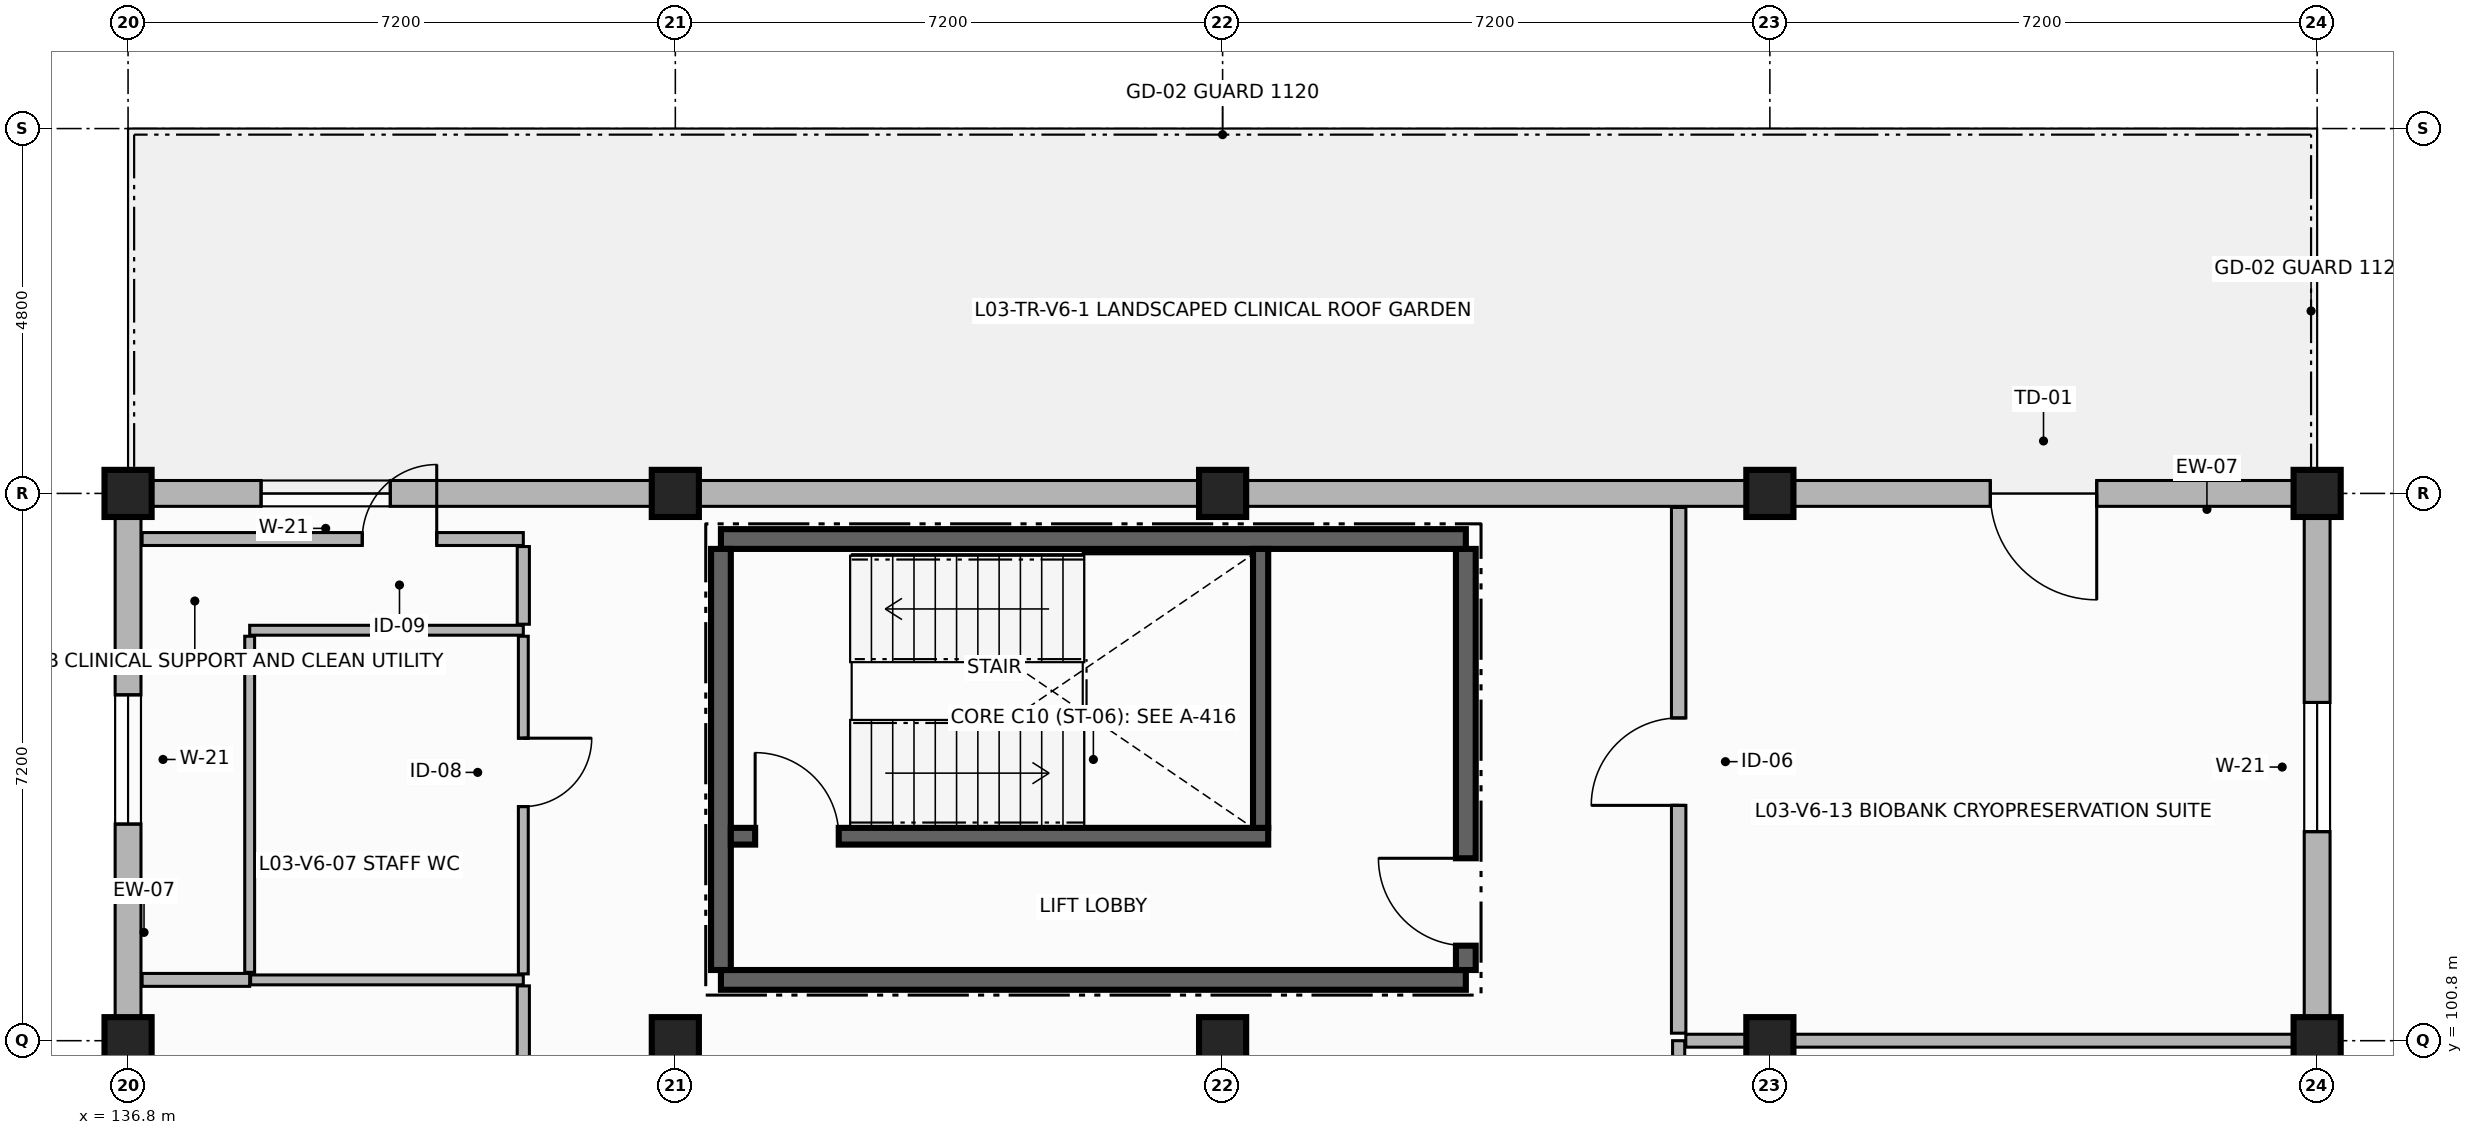
"""IFC4 building model, lengths in metres.
Left out: names, types, materials, properties, quantities, classifications, styles, units other than length and angle.
Written with IfcOpenShell. Run it as: python <this file> out.ifc"""

import sys

from ifc_helpers import new_model, si_unit, direction, frame, frame_2d, origin, origin_2d, place, context, subcontext, project, spatial, rectangle, extrude, element, fill, save


model = new_model("IFC4")
c1 = context("Model", 3, precision=1e-05, world=origin(), true_north=direction((0.0, 1.0)))
c2 = subcontext(c1, "Body", "Model", "MODEL_VIEW")
j1 = project(units=[si_unit("LENGTHUNIT", "METRE"), si_unit("PLANEANGLEUNIT", "RADIAN")], contexts=[c1])
p1 = place(None, origin())
s1 = spatial("IfcSite", under=j1, at=p1, CompositionType="ELEMENT")
p2 = place(p1, origin())
s2 = spatial("IfcBuilding", under=s1, at=p2, CompositionType="ELEMENT")
p3 = place(p2, frame((0.0, 0.0, 12.3)))
s3 = spatial("IfcBuildingStorey", under=s2, at=p3, CompositionType="ELEMENT", Elevation=12.3)
for number, where, z_axis, x_axis in (
    (1, (136.8, 100.8, 0.0), (0.0, 0.0, 1.0), (1.0, 0.0, 0.0)),
    (2, (136.8, 108.0, 0.0), (0.0, 0.0, 1.0), (1.0, 0.0, 0.0)),
    (3, (144.0, 100.8, 0.0), (0.0, 0.0, 1.0), (1.0, 0.0, 0.0)),
    (4, (144.0, 108.0, 0.0), (0.0, 0.0, 1.0), (1.0, 0.0, 0.0)),
    (5, (151.2, 100.8, 0.0), (0.0, 0.0, 1.0), (1.0, 0.0, 0.0)),
    (6, (151.2, 108.0, 0.0), (0.0, 0.0, 1.0), (1.0, 0.0, 0.0)),
    (7, (158.4, 100.8, 0.0), (0.0, 0.0, 1.0), (1.0, 0.0, 0.0)),
    (8, (158.4, 108.0, 0.0), (0.0, 0.0, 1.0), (1.0, 0.0, 0.0)),
    (9, (165.6, 100.8, 0.0), (0.0, 0.0, 1.0), (1.0, 0.0, 0.0)),
    (10, (165.6, 108.0, 0.0), (0.0, 0.0, 1.0), (1.0, 0.0, 0.0)),
):
    element("IfcColumn", number, at=place(p3, frame(where, z_axis=z_axis, x_axis=x_axis)), inside=s3, PredefinedType="COLUMN", context=c2, shape_type="SweptSolid", body=[
        extrude(rectangle(XDim=0.62, YDim=0.62, at=origin_2d()), origin(), (0.0, 0.0, 1.0), 3.38),
    ])
p4 = place(p3, frame((165.6, 93.6, 0.0), z_axis=(0.0, 0.0, 1.0), x_axis=(0.0, 1.0, 0.0)))
e11 = element("IfcWall", 11, at=p4, inside=s3, PredefinedType="SOLIDWALL", context=c2, shape_type="SweptSolid", body=[
    extrude(rectangle(XDim=7.2, YDim=0.34, at=frame_2d((3.6, 0.0))), origin(), (0.0, 0.0, 1.0), 2.71),
])
p5 = place(p4, frame((2.75, 0.0, 0.85)))
e12 = element("IfcOpeningElement", 12, at=p5, cuts=e11, PredefinedType="OPENING", context=c2, shape_type="SweptSolid", body=[
    extrude(rectangle(XDim=1.7, YDim=1.65, at=frame_2d((0.85, 0.825))), frame((0.0, 0.18, 0.0), z_axis=(0.0, -1.0, 0.0), x_axis=(1.0, 0.0, 0.0)), (0.0, 0.0, 1.0), 0.36),
])
p6 = place(p3, frame((165.6, 100.8, 0.0), z_axis=(0.0, 0.0, 1.0), x_axis=(0.0, 1.0, 0.0)))
e13 = element("IfcWall", 13, at=p6, inside=s3, PredefinedType="SOLIDWALL", context=c2, shape_type="SweptSolid", body=[
    extrude(rectangle(XDim=7.2, YDim=0.34, at=frame_2d((3.6, 0.0))), origin(), (0.0, 0.0, 1.0), 2.71),
])
p7 = place(p6, frame((2.75, 0.0, 0.85)))
e14 = element("IfcOpeningElement", 14, at=p7, cuts=e13, PredefinedType="OPENING", context=c2, shape_type="SweptSolid", body=[
    extrude(rectangle(XDim=1.7, YDim=1.65, at=frame_2d((0.85, 0.825))), frame((0.0, 0.18, 0.0), z_axis=(0.0, -1.0, 0.0), x_axis=(1.0, 0.0, 0.0)), (0.0, 0.0, 1.0), 0.36),
])
p8 = place(p3, frame((165.6, 108.0, 0.0), z_axis=(0.0, 0.0, 1.0), x_axis=(-1.0, 0.0, 0.0)))
e15 = element("IfcWall", 15, at=p8, inside=s3, PredefinedType="SOLIDWALL", context=c2, shape_type="SweptSolid", body=[
    extrude(rectangle(XDim=7.2, YDim=0.34, at=frame_2d((3.6, 0.0))), origin(), (0.0, 0.0, 1.0), 2.71),
])
p9 = place(p8, frame((2.9, 0.0, 0.0)))
e16 = element("IfcOpeningElement", 16, at=p9, cuts=e15, PredefinedType="OPENING", context=c2, shape_type="SweptSolid", body=[
    extrude(rectangle(XDim=1.4, YDim=2.25, at=frame_2d((0.7, 1.125))), frame((0.0, 0.18, 0.0), z_axis=(0.0, -1.0, 0.0), x_axis=(1.0, 0.0, 0.0)), (0.0, 0.0, 1.0), 0.36),
])
for number, where, z_axis, x_axis in (
    (17, (158.4, 108.0, 0.0), (0.0, 0.0, 1.0), (-1.0, 0.0, 0.0)),
    (18, (151.2, 108.0, 0.0), (0.0, 0.0, 1.0), (-1.0, 0.0, 0.0)),
):
    element("IfcWall", number, at=place(p3, frame(where, z_axis=z_axis, x_axis=x_axis)), inside=s3, PredefinedType="SOLIDWALL", context=c2, shape_type="SweptSolid", body=[
        extrude(rectangle(XDim=7.2, YDim=0.34, at=frame_2d((3.6, 0.0))), origin(), (0.0, 0.0, 1.0), 2.71),
    ])
p10 = place(p3, frame((144.0, 108.0, 0.0), z_axis=(0.0, 0.0, 1.0), x_axis=(-1.0, 0.0, 0.0)))
e19 = element("IfcWall", 19, at=p10, inside=s3, PredefinedType="SOLIDWALL", context=c2, shape_type="SweptSolid", body=[
    extrude(rectangle(XDim=7.2, YDim=0.34, at=frame_2d((3.6, 0.0))), origin(), (0.0, 0.0, 1.0), 2.71),
])
p11 = place(p10, frame((3.75, 0.0, 0.85)))
e20 = element("IfcOpeningElement", 20, at=p11, cuts=e19, PredefinedType="OPENING", context=c2, shape_type="SweptSolid", body=[
    extrude(rectangle(XDim=1.7, YDim=1.65, at=frame_2d((0.85, 0.825))), frame((0.0, 0.18, 0.0), z_axis=(0.0, -1.0, 0.0), x_axis=(1.0, 0.0, 0.0)), (0.0, 0.0, 1.0), 0.36),
])
p12 = place(p3, frame((136.8, 108.0, 0.0), z_axis=(0.0, 0.0, 1.0), x_axis=(0.0, -1.0, 0.0)))
e21 = element("IfcWall", 21, at=p12, inside=s3, PredefinedType="SOLIDWALL", context=c2, shape_type="SweptSolid", body=[
    extrude(rectangle(XDim=7.2, YDim=0.34, at=frame_2d((3.6, 0.0))), origin(), (0.0, 0.0, 1.0), 2.71),
])
p13 = place(p12, frame((2.65, 0.0, 0.85)))
e22 = element("IfcOpeningElement", 22, at=p13, cuts=e21, PredefinedType="OPENING", context=c2, shape_type="SweptSolid", body=[
    extrude(rectangle(XDim=1.7, YDim=1.65, at=frame_2d((0.85, 0.825))), frame((0.0, 0.18, 0.0), z_axis=(0.0, -1.0, 0.0), x_axis=(1.0, 0.0, 0.0)), (0.0, 0.0, 1.0), 0.36),
])
p14 = place(p3, frame((136.8, 100.8, 0.0), z_axis=(0.0, 0.0, 1.0), x_axis=(0.0, -1.0, 0.0)))
e23 = element("IfcWall", 23, at=p14, inside=s3, PredefinedType="SOLIDWALL", context=c2, shape_type="SweptSolid", body=[
    extrude(rectangle(XDim=7.2, YDim=0.34, at=frame_2d((3.6, 0.0))), origin(), (0.0, 0.0, 1.0), 2.71),
])
p15 = place(p14, frame((2.75, 0.0, 0.85)))
e24 = element("IfcOpeningElement", 24, at=p15, cuts=e23, PredefinedType="OPENING", context=c2, shape_type="SweptSolid", body=[
    extrude(rectangle(XDim=1.7, YDim=1.65, at=frame_2d((0.85, 0.825))), frame((0.0, 0.18, 0.0), z_axis=(0.0, -1.0, 0.0), x_axis=(1.0, 0.0, 0.0)), (0.0, 0.0, 1.0), 0.36),
])
p16 = place(p3, frame((144.6, 101.6, 0.0), z_axis=(0.0, 0.0, 1.0), x_axis=(1.0, 0.0, 0.0)))
e25 = element("IfcWall", 25, at=p16, inside=s3, PredefinedType="SHEAR", context=c2, shape_type="SweptSolid", body=[
    extrude(rectangle(XDim=9.8, YDim=0.26, at=frame_2d((4.9, 0.0))), origin(), (0.0, 0.0, 1.0), 3.38),
])
p17 = place(p3, frame((154.4, 101.73, 0.0), z_axis=(0.0, 0.0, 1.0), x_axis=(0.0, 1.0, 0.0)))
e26 = element("IfcWall", 26, at=p17, inside=s3, PredefinedType="SHEAR", context=c2, shape_type="SweptSolid", body=[
    extrude(rectangle(XDim=5.54, YDim=0.26, at=frame_2d((2.77, 0.0))), origin(), (0.0, 0.0, 1.0), 3.38),
])
p18 = place(p17, frame((0.32, 0.0, 0.0)))
e27 = element("IfcOpeningElement", 27, at=p18, cuts=e26, PredefinedType="OPENING", context=c2, shape_type="SweptSolid", body=[
    extrude(rectangle(XDim=1.15, YDim=2.2, at=frame_2d((0.575, 1.1))), frame((0.0, 0.14, 0.0), z_axis=(0.0, -1.0, 0.0), x_axis=(1.0, 0.0, 0.0)), (0.0, 0.0, 1.0), 0.28),
])
p19 = place(p3, frame((154.4, 107.4, 0.0), z_axis=(0.0, 0.0, 1.0), x_axis=(-1.0, 0.0, 0.0)))
e28 = element("IfcWall", 28, at=p19, inside=s3, PredefinedType="SHEAR", context=c2, shape_type="SweptSolid", body=[
    extrude(rectangle(XDim=9.8, YDim=0.26, at=frame_2d((4.9, 0.0))), origin(), (0.0, 0.0, 1.0), 3.38),
])
p20 = place(p3, frame((144.6, 107.27, 0.0), z_axis=(0.0, 0.0, 1.0), x_axis=(0.0, -1.0, 0.0)))
e29 = element("IfcWall", 29, at=p20, inside=s3, PredefinedType="SHEAR", context=c2, shape_type="SweptSolid", body=[
    extrude(rectangle(XDim=5.54, YDim=0.26, at=frame_2d((2.77, 0.0))), origin(), (0.0, 0.0, 1.0), 3.38),
])
p21 = place(p3, frame((144.73, 103.49, 0.0), z_axis=(0.0, 0.0, 1.0), x_axis=(1.0, 0.0, 0.0)))
e30 = element("IfcWall", 30, at=p21, inside=s3, PredefinedType="SHEAR", context=c2, shape_type="SweptSolid", body=[
    extrude(rectangle(XDim=7.07, YDim=0.22, at=frame_2d((3.535, 0.0))), origin(), (0.0, 0.0, 1.0), 3.38),
])
p22 = place(p21, frame((0.32, 0.0, 0.0)))
e31 = element("IfcOpeningElement", 31, at=p22, cuts=e30, PredefinedType="OPENING", context=c2, shape_type="SweptSolid", body=[
    extrude(rectangle(XDim=1.1, YDim=2.15, at=frame_2d((0.55, 1.075))), frame((0.0, 0.12, 0.0), z_axis=(0.0, -1.0, 0.0), x_axis=(1.0, 0.0, 0.0)), (0.0, 0.0, 1.0), 0.24),
])
p23 = place(p3, frame((151.7, 103.6, 0.0), z_axis=(0.0, 0.0, 1.0), x_axis=(0.0, 1.0, 0.0)))
e32 = element("IfcWall", 32, at=p23, inside=s3, PredefinedType="SHEAR", context=c2, shape_type="SweptSolid", body=[
    extrude(rectangle(XDim=3.67, YDim=0.2, at=frame_2d((1.835, 0.0))), origin(), (0.0, 0.0, 1.0), 3.38),
])
p24 = place(p3, frame((136.985, 101.6, 0.0), z_axis=(0.0, 0.0, 1.0), x_axis=(1.0, 0.0, 0.0)))
e33 = element("IfcWall", 33, at=p24, inside=s3, PredefinedType="PARTITIONING", context=c2, shape_type="SweptSolid", body=[
    extrude(rectangle(XDim=1.415, YDim=0.17, at=frame_2d((0.708, 0.0))), origin(), (0.0, 0.0, 1.0), 2.69),
])
p25 = place(p3, frame((138.412, 101.6, 0.0), z_axis=(0.0, 0.0, 1.0), x_axis=(1.0, 0.0, 0.0)))
e34 = element("IfcWall", 34, at=p25, inside=s3, PredefinedType="PARTITIONING", context=c2, shape_type="SweptSolid", body=[
    extrude(rectangle(XDim=3.588, YDim=0.13, at=frame_2d((1.794, 0.0))), origin(), (0.0, 0.0, 1.0), 2.69),
])
p26 = place(p3, frame((142.0, 101.521, 0.0), z_axis=(0.0, 0.0, 1.0), x_axis=(0.0, -1.0, 0.0)))
e35 = element("IfcWall", 35, at=p26, inside=s3, PredefinedType="PARTITIONING", context=c2, shape_type="SweptSolid", body=[
    extrude(rectangle(XDim=2.721, YDim=0.16, at=frame_2d((1.36, 0.0))), origin(), (0.0, 0.0, 1.0), 2.69),
])
p27 = place(p3, frame((138.4, 106.2, 0.0), z_axis=(0.0, 0.0, 1.0), x_axis=(1.0, 0.0, 0.0)))
e36 = element("IfcWall", 36, at=p27, inside=s3, PredefinedType="PARTITIONING", context=c2, shape_type="SweptSolid", body=[
    extrude(rectangle(XDim=3.6, YDim=0.13, at=frame_2d((1.8, 0.0))), origin(), (0.0, 0.0, 1.0), 2.69),
])
p28 = place(p3, frame((142.0, 106.121, 0.0), z_axis=(0.0, 0.0, 1.0), x_axis=(0.0, -1.0, 0.0)))
e37 = element("IfcWall", 37, at=p28, inside=s3, PredefinedType="PARTITIONING", context=c2, shape_type="SweptSolid", body=[
    extrude(rectangle(XDim=4.442, YDim=0.13, at=frame_2d((2.221, 0.0))), origin(), (0.0, 0.0, 1.0), 2.69),
])
p29 = place(p28, frame((1.341, 0.0, 0.0)))
e38 = element("IfcOpeningElement", 38, at=p29, cuts=e37, PredefinedType="OPENING", context=c2, shape_type="SweptSolid", body=[
    extrude(rectangle(XDim=0.9, YDim=2.1, at=frame_2d((0.45, 1.05))), frame((0.0, 0.075, 0.0), z_axis=(0.0, -1.0, 0.0), x_axis=(1.0, 0.0, 0.0)), (0.0, 0.0, 1.0), 0.15),
])
p30 = place(p3, frame((138.4, 101.699, 0.0), z_axis=(0.0, 0.0, 1.0), x_axis=(0.0, 1.0, 0.0)))
e39 = element("IfcWall", 39, at=p30, inside=s3, PredefinedType="PARTITIONING", context=c2, shape_type="SweptSolid", body=[
    extrude(rectangle(XDim=4.422, YDim=0.13, at=frame_2d((2.211, 0.0))), origin(), (0.0, 0.0, 1.0), 2.69),
])
p31 = place(p3, frame((136.985, 107.4, 0.0), z_axis=(0.0, 0.0, 1.0), x_axis=(1.0, 0.0, 0.0)))
e40 = element("IfcWall", 40, at=p31, inside=s3, PredefinedType="PARTITIONING", context=c2, shape_type="SweptSolid", body=[
    extrude(rectangle(XDim=5.015, YDim=0.17, at=frame_2d((2.507, 0.0))), origin(), (0.0, 0.0, 1.0), 2.69),
])
p32 = place(p31, frame((2.896, 0.0, 0.0)))
e41 = element("IfcOpeningElement", 41, at=p32, cuts=e40, PredefinedType="OPENING", context=c2, shape_type="SweptSolid", body=[
    extrude(rectangle(XDim=0.98, YDim=2.15, at=frame_2d((0.49, 1.075))), frame((0.0, 0.095, 0.0), z_axis=(0.0, -1.0, 0.0), x_axis=(1.0, 0.0, 0.0)), (0.0, 0.0, 1.0), 0.19),
])
p33 = place(p3, frame((142.0, 107.301, 0.0), z_axis=(0.0, 0.0, 1.0), x_axis=(0.0, -1.0, 0.0)))
e42 = element("IfcWall", 42, at=p33, inside=s3, PredefinedType="PARTITIONING", context=c2, shape_type="SweptSolid", body=[
    extrude(rectangle(XDim=1.022, YDim=0.16, at=frame_2d((0.511, 0.0))), origin(), (0.0, 0.0, 1.0), 2.69),
])
p34 = place(p3, frame((157.2, 93.699, 0.0), z_axis=(0.0, 0.0, 1.0), x_axis=(0.0, 1.0, 0.0)))
e43 = element("IfcWall", 43, at=p34, inside=s3, PredefinedType="PARTITIONING", context=c2, shape_type="SweptSolid", body=[
    extrude(rectangle(XDim=7.101, YDim=0.16, at=frame_2d((3.551, 0.0))), origin(), (0.0, 0.0, 1.0), 2.69),
])
p35 = place(p34, frame((2.857, 0.0, 0.0)))
e44 = element("IfcOpeningElement", 44, at=p35, cuts=e43, PredefinedType="OPENING", context=c2, shape_type="SweptSolid", body=[
    extrude(rectangle(XDim=1.15, YDim=2.25, at=frame_2d((0.575, 1.125))), frame((0.0, 0.09, 0.0), z_axis=(0.0, -1.0, 0.0), x_axis=(1.0, 0.0, 0.0)), (0.0, 0.0, 1.0), 0.18),
])
p36 = place(p3, frame((157.294, 100.8, 0.0), z_axis=(0.0, 0.0, 1.0), x_axis=(1.0, 0.0, 0.0)))
e45 = element("IfcWall", 45, at=p36, inside=s3, PredefinedType="PARTITIONING", context=c2, shape_type="SweptSolid", body=[
    extrude(rectangle(XDim=8.121, YDim=0.17, at=frame_2d((4.061, 0.0))), origin(), (0.0, 0.0, 1.0), 2.69),
])
p37 = place(p3, frame((157.2, 100.899, 0.0), z_axis=(0.0, 0.0, 1.0), x_axis=(0.0, 1.0, 0.0)))
e46 = element("IfcWall", 46, at=p37, inside=s3, PredefinedType="PARTITIONING", context=c2, shape_type="SweptSolid", body=[
    extrude(rectangle(XDim=6.916, YDim=0.19, at=frame_2d((3.458, 0.0))), origin(), (0.0, 0.0, 1.0), 2.69),
])
p38 = place(p37, frame((2.997, 0.0, 0.0)))
e47 = element("IfcOpeningElement", 47, at=p38, cuts=e46, PredefinedType="OPENING", context=c2, shape_type="SweptSolid", body=[
    extrude(rectangle(XDim=1.15, YDim=2.25, at=frame_2d((0.575, 1.125))), frame((0.0, 0.105, 0.0), z_axis=(0.0, -1.0, 0.0), x_axis=(1.0, 0.0, 0.0)), (0.0, 0.0, 1.0), 0.21),
])
p39 = place(p7, origin())
e48 = element("IfcWindow", 48, at=p39, inside=s3, PartitioningType="SINGLE_PANEL", PredefinedType="WINDOW", context=c2, shape_type="SweptSolid", body=[
    extrude(rectangle(XDim=1.7, YDim=1.65, at=frame_2d((0.85, 0.825))), frame((0.0, 0.03, 0.0), z_axis=(0.0, -1.0, 0.0), x_axis=(1.0, 0.0, 0.0)), (0.0, 0.0, 1.0), 0.06),
])
fill(e14, e48)
p40 = place(p9, origin())
e49 = element("IfcDoor", 49, at=p40, inside=s3, OperationType="SINGLE_SWING_LEFT", PredefinedType="DOOR", context=c2, shape_type="SweptSolid", body=[
    extrude(rectangle(XDim=1.4, YDim=2.25, at=frame_2d((0.7, 1.125))), frame((0.0, 0.025, 0.0), z_axis=(0.0, -1.0, 0.0), x_axis=(1.0, 0.0, 0.0)), (0.0, 0.0, 1.0), 0.05),
])
fill(e16, e49)
p41 = place(p11, origin())
e50 = element("IfcWindow", 50, at=p41, inside=s3, PartitioningType="SINGLE_PANEL", PredefinedType="WINDOW", context=c2, shape_type="SweptSolid", body=[
    extrude(rectangle(XDim=1.7, YDim=1.65, at=frame_2d((0.85, 0.825))), frame((0.0, 0.03, 0.0), z_axis=(0.0, -1.0, 0.0), x_axis=(1.0, 0.0, 0.0)), (0.0, 0.0, 1.0), 0.06),
])
fill(e20, e50)
p42 = place(p13, origin())
e51 = element("IfcWindow", 51, at=p42, inside=s3, PartitioningType="SINGLE_PANEL", PredefinedType="WINDOW", context=c2, shape_type="SweptSolid", body=[
    extrude(rectangle(XDim=1.7, YDim=1.65, at=frame_2d((0.85, 0.825))), frame((0.0, 0.03, 0.0), z_axis=(0.0, -1.0, 0.0), x_axis=(1.0, 0.0, 0.0)), (0.0, 0.0, 1.0), 0.06),
])
fill(e22, e51)
p43 = place(p22, origin())
e52 = element("IfcDoor", 52, at=p43, inside=s3, OperationType="SINGLE_SWING_LEFT", PredefinedType="DOOR", context=c2, shape_type="SweptSolid", body=[
    extrude(rectangle(XDim=1.1, YDim=2.15, at=frame_2d((0.55, 1.075))), frame((0.0, 0.025, 0.0), z_axis=(0.0, -1.0, 0.0), x_axis=(1.0, 0.0, 0.0)), (0.0, 0.0, 1.0), 0.05),
])
fill(e31, e52)
p44 = place(p18, origin())
e53 = element("IfcDoor", 53, at=p44, inside=s3, OperationType="SINGLE_SWING_RIGHT", PredefinedType="DOOR", context=c2, shape_type="SweptSolid", body=[
    extrude(rectangle(XDim=1.15, YDim=2.2, at=frame_2d((0.575, 1.1))), frame((0.0, 0.025, 0.0), z_axis=(0.0, -1.0, 0.0), x_axis=(1.0, 0.0, 0.0)), (0.0, 0.0, 1.0), 0.05),
])
fill(e27, e53)
p45 = place(p29, origin())
e54 = element("IfcDoor", 54, at=p45, inside=s3, OperationType="SINGLE_SWING_LEFT", PredefinedType="DOOR", context=c2, shape_type="SweptSolid", body=[
    extrude(rectangle(XDim=0.9, YDim=2.1, at=frame_2d((0.45, 1.05))), frame((0.0, 0.025, 0.0), z_axis=(0.0, -1.0, 0.0), x_axis=(1.0, 0.0, 0.0)), (0.0, 0.0, 1.0), 0.05),
])
fill(e38, e54)
p46 = place(p32, origin())
e55 = element("IfcDoor", 55, at=p46, inside=s3, OperationType="SINGLE_SWING_RIGHT", PredefinedType="DOOR", context=c2, shape_type="SweptSolid", body=[
    extrude(rectangle(XDim=0.98, YDim=2.15, at=frame_2d((0.49, 1.075))), frame((0.0, 0.025, 0.0), z_axis=(0.0, -1.0, 0.0), x_axis=(1.0, 0.0, 0.0)), (0.0, 0.0, 1.0), 0.05),
])
fill(e41, e55)
p47 = place(p38, origin())
e56 = element("IfcDoor", 56, at=p47, inside=s3, OperationType="SINGLE_SWING_LEFT", PredefinedType="DOOR", context=c2, shape_type="SweptSolid", body=[
    extrude(rectangle(XDim=1.15, YDim=2.25, at=frame_2d((0.575, 1.125))), frame((0.0, 0.025, 0.0), z_axis=(0.0, -1.0, 0.0), x_axis=(1.0, 0.0, 0.0)), (0.0, 0.0, 1.0), 0.05),
])
fill(e47, e56)
save(model, sys.argv[1])
